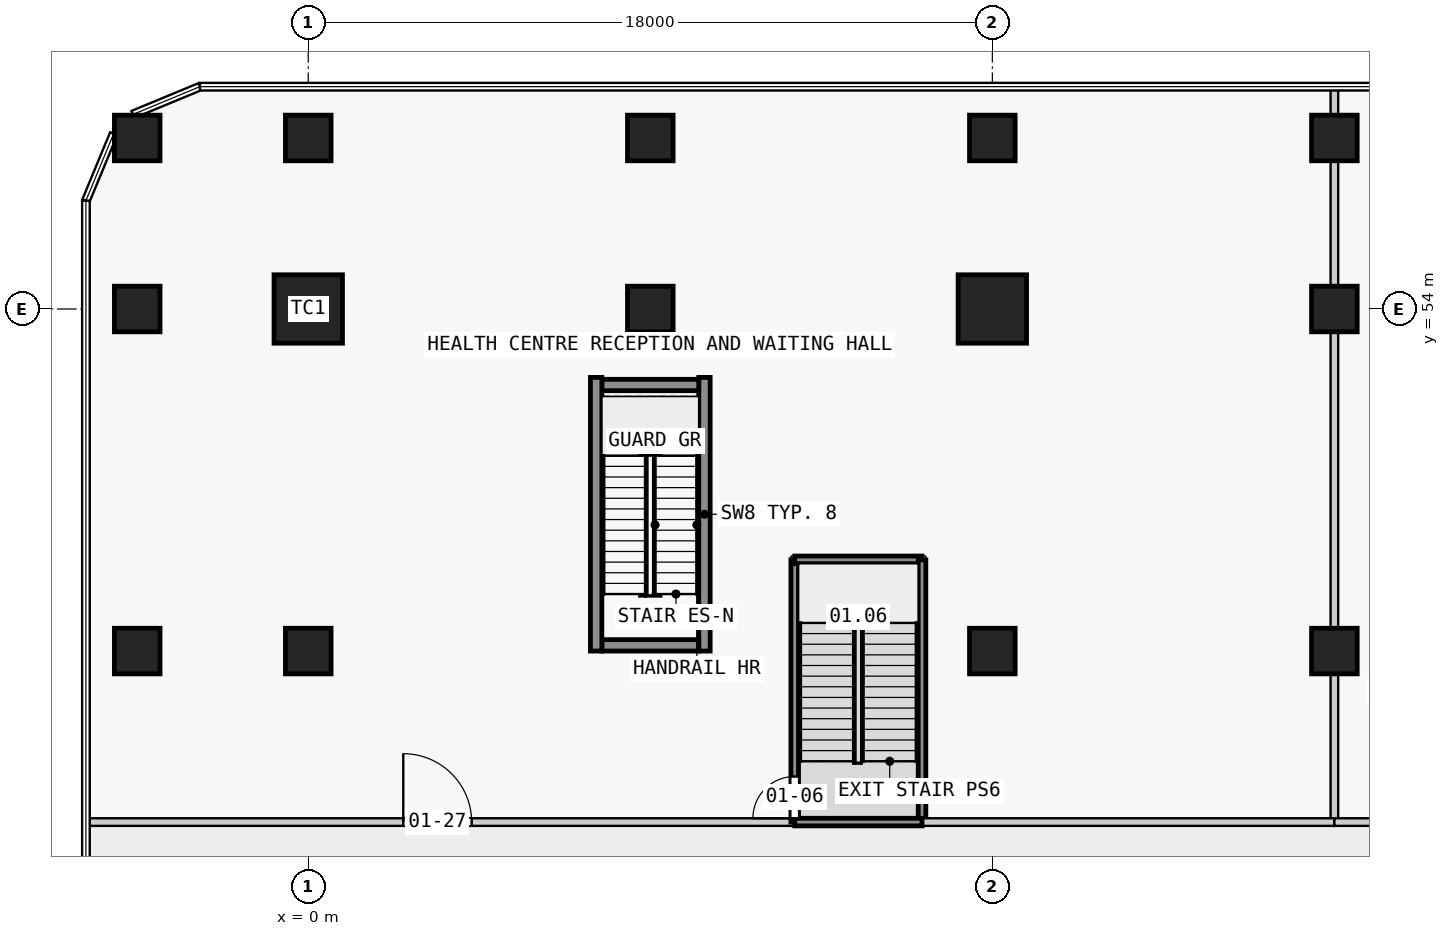
"""IFC4 building model, lengths in metres.
Left out: names, types, materials, properties, quantities, classifications, styles, units other than length and angle.
Written with IfcOpenShell. Run it as: python <this file> out.ifc"""

import sys

from ifc_helpers import new_model, si_unit, direction, frame, frame_2d, origin, origin_2d, place, context, subcontext, project, spatial, rectangle, extrude, element, fill, save


model = new_model("IFC4")
c1 = context("Model", 3, precision=1e-05, world=origin(), true_north=direction((0.0, 1.0)))
c2 = subcontext(c1, "Body", "Model", "MODEL_VIEW")
j1 = project(units=[si_unit("LENGTHUNIT", "METRE"), si_unit("PLANEANGLEUNIT", "RADIAN")], contexts=[c1])
p1 = place(None, origin())
s1 = spatial("IfcSite", under=j1, at=p1, CompositionType="ELEMENT")
p2 = place(p1, origin())
s2 = spatial("IfcBuilding", under=s1, at=p2, CompositionType="ELEMENT")
p3 = place(p2, frame((0.0, 0.0, 8.0)))
s3 = spatial("IfcBuildingStorey", under=s2, at=p3, CompositionType="ELEMENT", Elevation=8.0)
for number, where, z_axis, x_axis in (
    (1, (-4.5, 45.0, 0.0), (0.0, 0.0, 1.0), (1.0, 0.0, 0.0)),
    (2, (-4.5, 54.0, 0.0), (0.0, 0.0, 1.0), (1.0, 0.0, 0.0)),
    (3, (-4.5, 58.5, 0.0), (0.0, 0.0, 1.0), (1.0, 0.0, 0.0)),
    (4, (0.0, 45.0, 0.0), (0.0, 0.0, 1.0), (1.0, 0.0, 0.0)),
):
    element("IfcColumn", number, at=place(p3, frame(where, z_axis=z_axis, x_axis=x_axis)), inside=s3, PredefinedType="COLUMN", context=c2, shape_type="SweptSolid", body=[
        extrude(rectangle(XDim=1.2, YDim=1.2, at=origin_2d()), origin(), (0.0, 0.0, 1.0), 4.8),
    ])
p4 = place(p3, frame((0.0, 54.0, 0.0), z_axis=(0.0, 0.0, 1.0), x_axis=(1.0, 0.0, 0.0)))
e5 = element("IfcColumn", 5, at=p4, inside=s3, PredefinedType="COLUMN", context=c2, shape_type="SweptSolid", body=[
    extrude(rectangle(XDim=1.8, YDim=1.8, at=origin_2d()), origin(), (0.0, 0.0, 1.0), 4.8),
])
for number, where, z_axis, x_axis in (
    (6, (0.0, 58.5, 0.0), (0.0, 0.0, 1.0), (1.0, 0.0, 0.0)),
    (7, (9.0, 54.0, 0.0), (0.0, 0.0, 1.0), (1.0, 0.0, 0.0)),
    (8, (9.0, 58.5, 0.0), (0.0, 0.0, 1.0), (1.0, 0.0, 0.0)),
    (9, (18.0, 45.0, 0.0), (0.0, 0.0, 1.0), (1.0, 0.0, 0.0)),
):
    element("IfcColumn", number, at=place(p3, frame(where, z_axis=z_axis, x_axis=x_axis)), inside=s3, PredefinedType="COLUMN", context=c2, shape_type="SweptSolid", body=[
        extrude(rectangle(XDim=1.2, YDim=1.2, at=origin_2d()), origin(), (0.0, 0.0, 1.0), 4.8),
    ])
p5 = place(p3, frame((18.0, 54.0, 0.0), z_axis=(0.0, 0.0, 1.0), x_axis=(1.0, 0.0, 0.0)))
e10 = element("IfcColumn", 10, at=p5, inside=s3, PredefinedType="COLUMN", context=c2, shape_type="SweptSolid", body=[
    extrude(rectangle(XDim=1.8, YDim=1.8, at=origin_2d()), origin(), (0.0, 0.0, 1.0), 4.8),
])
for number, where, z_axis, x_axis in (
    (11, (18.0, 58.5, 0.0), (0.0, 0.0, 1.0), (1.0, 0.0, 0.0)),
    (12, (27.0, 45.0, 0.0), (0.0, 0.0, 1.0), (1.0, 0.0, 0.0)),
    (13, (27.0, 54.0, 0.0), (0.0, 0.0, 1.0), (1.0, 0.0, 0.0)),
    (14, (27.0, 58.5, 0.0), (0.0, 0.0, 1.0), (1.0, 0.0, 0.0)),
):
    element("IfcColumn", number, at=place(p3, frame(where, z_axis=z_axis, x_axis=x_axis)), inside=s3, PredefinedType="COLUMN", context=c2, shape_type="SweptSolid", body=[
        extrude(rectangle(XDim=1.2, YDim=1.2, at=origin_2d()), origin(), (0.0, 0.0, 1.0), 4.8),
    ])
for number, where, z_axis, x_axis in (
    (15, (7.725, 45.15, 0.0), (0.0, 0.0, 1.0), (1.0, 0.0, 0.0)),
    (16, (7.725, 52.0, 0.0), (0.0, 0.0, 1.0), (1.0, 0.0, 0.0)),
):
    element("IfcWall", number, at=place(p3, frame(where, z_axis=z_axis, x_axis=x_axis)), inside=s3, PredefinedType="SHEAR", context=c2, shape_type="SweptSolid", body=[
        extrude(rectangle(XDim=2.55, YDim=0.3, at=frame_2d((1.275, 0.0))), origin(), (0.0, 0.0, 1.0), 4.8),
    ])
for number, where, z_axis, x_axis in (
    (17, (7.575, 45.0, 0.0), (0.0, 0.0, 1.0), (0.0, 1.0, 0.0)),
    (18, (10.425, 45.0, 0.0), (0.0, 0.0, 1.0), (0.0, 1.0, 0.0)),
):
    element("IfcWall", number, at=place(p3, frame(where, z_axis=z_axis, x_axis=x_axis)), inside=s3, PredefinedType="SHEAR", context=c2, shape_type="SweptSolid", body=[
        extrude(rectangle(XDim=7.2, YDim=0.3, at=frame_2d((3.6, 0.0))), origin(), (0.0, 0.0, 1.0), 4.8),
    ])
p6 = place(p3, frame((27.0, 59.85, 0.0), z_axis=(0.0, 0.0, 1.0), x_axis=(0.0, -1.0, 0.0)))
e19 = element("IfcWall", 19, at=p6, inside=s3, PredefinedType="PARTITIONING", context=c2, shape_type="SweptSolid", body=[
    extrude(rectangle(XDim=0.75, YDim=0.2, at=frame_2d((0.375, 0.0))), origin(), (0.0, 0.0, 1.0), 4.45),
])
p7 = place(p3, frame((27.0, 57.9, 0.0), z_axis=(0.0, 0.0, 1.0), x_axis=(0.0, -1.0, 0.0)))
e20 = element("IfcWall", 20, at=p7, inside=s3, PredefinedType="PARTITIONING", context=c2, shape_type="SweptSolid", body=[
    extrude(rectangle(XDim=3.3, YDim=0.2, at=frame_2d((1.65, 0.0))), origin(), (0.0, 0.0, 1.0), 3.75),
])
p8 = place(p3, frame((27.0, 53.4, 0.0), z_axis=(0.0, 0.0, 1.0), x_axis=(0.0, -1.0, 0.0)))
e21 = element("IfcWall", 21, at=p8, inside=s3, PredefinedType="PARTITIONING", context=c2, shape_type="SweptSolid", body=[
    extrude(rectangle(XDim=7.8, YDim=0.2, at=frame_2d((3.9, 0.0))), origin(), (0.0, 0.0, 1.0), 3.75),
])
p9 = place(p3, frame((27.0, 44.4, 0.0), z_axis=(0.0, 0.0, 1.0), x_axis=(0.0, -1.0, 0.0)))
e22 = element("IfcWall", 22, at=p9, inside=s3, PredefinedType="PARTITIONING", context=c2, shape_type="SweptSolid", body=[
    extrude(rectangle(XDim=3.9, YDim=0.2, at=frame_2d((1.95, 0.0))), origin(), (0.0, 0.0, 1.0), 3.75),
])
p10 = place(p3, frame((-5.85, 40.5, 0.0), z_axis=(0.0, 0.0, 1.0), x_axis=(1.0, 0.0, 0.0)))
e23 = element("IfcWall", 23, at=p10, inside=s3, PredefinedType="PARTITIONING", context=c2, shape_type="SweptSolid", body=[
    extrude(rectangle(XDim=18.65, YDim=0.2, at=frame_2d((9.325, 0.0))), origin(), (0.0, 0.0, 1.0), 3.75),
])
p11 = place(p10, frame((8.35, 0.0, 0.0)))
e24 = element("IfcOpeningElement", 24, at=p11, cuts=e23, PredefinedType="OPENING", context=c2, shape_type="SweptSolid", body=[
    extrude(rectangle(XDim=1.8, YDim=2.1, at=frame_2d((0.9, 1.05))), frame((0.0, 0.11, 0.0), z_axis=(0.0, -1.0, 0.0), x_axis=(1.0, 0.0, 0.0)), (0.0, 0.0, 1.0), 0.22),
])
p12 = place(p3, frame((12.8, 40.5, 0.0), z_axis=(0.0, 0.0, 1.0), x_axis=(0.0, 1.0, 0.0)))
e25 = element("IfcWall", 25, at=p12, inside=s3, PredefinedType="PARTITIONING", context=c2, shape_type="SweptSolid", body=[
    extrude(rectangle(XDim=6.9, YDim=0.2, at=frame_2d((3.45, 0.0))), origin(), (0.0, 0.0, 1.0), 4.45),
])
p13 = place(p12, frame((0.1, 0.0, 0.0)))
e26 = element("IfcOpeningElement", 26, at=p13, cuts=e25, PredefinedType="OPENING", context=c2, shape_type="SweptSolid", body=[
    extrude(rectangle(XDim=1.1, YDim=2.1, at=frame_2d((0.55, 1.05))), frame((0.0, 0.11, 0.0), z_axis=(0.0, -1.0, 0.0), x_axis=(1.0, 0.0, 0.0)), (0.0, 0.0, 1.0), 0.22),
])
p14 = place(p3, frame((12.8, 47.4, 0.0), z_axis=(0.0, 0.0, 1.0), x_axis=(1.0, 0.0, 0.0)))
e27 = element("IfcWall", 27, at=p14, inside=s3, PredefinedType="PARTITIONING", context=c2, shape_type="SweptSolid", body=[
    extrude(rectangle(XDim=3.35, YDim=0.2, at=frame_2d((1.675, 0.0))), origin(), (0.0, 0.0, 1.0), 4.45),
])
p15 = place(p3, frame((16.15, 47.4, 0.0), z_axis=(0.0, 0.0, 1.0), x_axis=(0.0, -1.0, 0.0)))
e28 = element("IfcWall", 28, at=p15, inside=s3, PredefinedType="PARTITIONING", context=c2, shape_type="SweptSolid", body=[
    extrude(rectangle(XDim=6.9, YDim=0.2, at=frame_2d((3.45, 0.0))), origin(), (0.0, 0.0, 1.0), 4.45),
])
p16 = place(p3, frame((16.15, 40.5, 0.0), z_axis=(0.0, 0.0, 1.0), x_axis=(1.0, 0.0, 0.0)))
e29 = element("IfcWall", 29, at=p16, inside=s3, PredefinedType="PARTITIONING", context=c2, shape_type="SweptSolid", body=[
    extrude(rectangle(XDim=10.85, YDim=0.2, at=frame_2d((5.425, 0.0))), origin(), (0.0, 0.0, 1.0), 3.75),
])
p17 = place(p3, frame((27.0, 40.5, 0.0), z_axis=(0.0, 0.0, 1.0), x_axis=(1.0, 0.0, 0.0)))
e30 = element("IfcWall", 30, at=p17, inside=s3, PredefinedType="PARTITIONING", context=c2, shape_type="SweptSolid", body=[
    extrude(rectangle(XDim=3.6, YDim=0.2, at=frame_2d((1.8, 0.0))), origin(), (0.0, 0.0, 1.0), 3.75),
])
p18 = place(p3, frame((16.15, 40.5, 0.0), z_axis=(0.0, 0.0, 1.0), x_axis=(-1.0, 0.0, 0.0)))
e31 = element("IfcWall", 31, at=p18, inside=s3, PredefinedType="PARTITIONING", context=c2, shape_type="SweptSolid", body=[
    extrude(rectangle(XDim=3.35, YDim=0.2, at=frame_2d((1.675, 0.0))), origin(), (0.0, 0.0, 1.0), 4.45),
])
p19 = place(p13, origin())
e32 = element("IfcDoor", 32, at=p19, inside=s3, OperationType="SINGLE_SWING_LEFT", PredefinedType="DOOR", context=c2, shape_type="SweptSolid", body=[
    extrude(rectangle(XDim=1.1, YDim=2.1, at=frame_2d((0.55, 1.05))), frame((0.0, 0.025, 0.0), z_axis=(0.0, -1.0, 0.0), x_axis=(1.0, 0.0, 0.0)), (0.0, 0.0, 1.0), 0.05),
])
fill(e26, e32)
p20 = place(p11, origin())
e33 = element("IfcDoor", 33, at=p20, inside=s3, OperationType="DOUBLE_DOOR_SINGLE_SWING", PredefinedType="DOOR", context=c2, shape_type="SweptSolid", body=[
    extrude(rectangle(XDim=1.8, YDim=2.1, at=frame_2d((0.9, 1.05))), frame((0.0, 0.025, 0.0), z_axis=(0.0, -1.0, 0.0), x_axis=(1.0, 0.0, 0.0)), (0.0, 0.0, 1.0), 0.05),
])
fill(e24, e33)
save(model, sys.argv[1])
